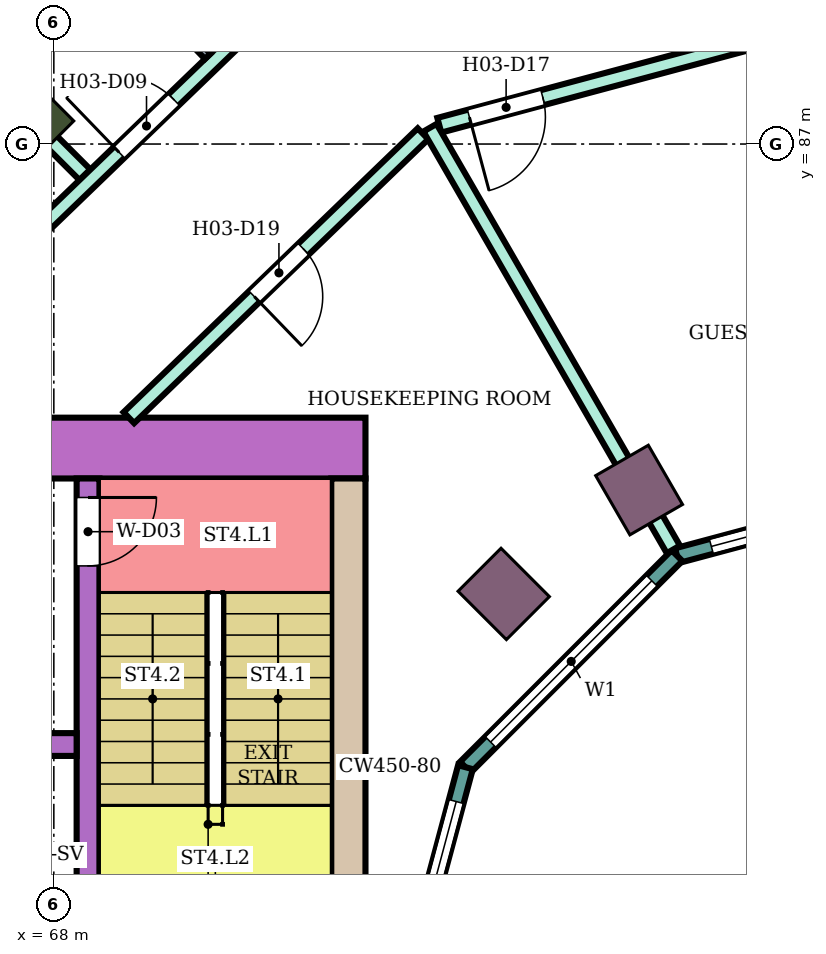
"""IFC4 building model, lengths in metres.
Left out: names, types, materials, properties, quantities, classifications, styles, units other than length and angle.
Written with IfcOpenShell. Run it as: python <this file> out.ifc"""

import sys

from ifc_helpers import new_model, si_unit, direction, frame, frame_2d, origin, origin_2d, place, context, subcontext, project, spatial, rectangle, extrude, element, fill, save


model = new_model("IFC4")
c1 = context("Model", 3, precision=1e-05, world=origin(), true_north=direction((0.0, 1.0)))
c2 = subcontext(c1, "Body", "Model", "MODEL_VIEW")
j1 = project(units=[si_unit("LENGTHUNIT", "METRE"), si_unit("PLANEANGLEUNIT", "RADIAN")], contexts=[c1])
p1 = place(None, origin())
s1 = spatial("IfcSite", under=j1, at=p1, CompositionType="ELEMENT")
p2 = place(p1, origin())
s2 = spatial("IfcBuilding", under=s1, at=p2, CompositionType="ELEMENT")
p3 = place(p2, frame((0.0, 0.0, 55.4)))
s3 = spatial("IfcBuildingStorey", under=s2, at=p3, CompositionType="ELEMENT", Elevation=55.4)
p4 = place(p3, frame((67.555, 87.445, 0.0), z_axis=(0.0, 0.0, 1.0), x_axis=(-0.707106781187, 0.707106781187, 0.0)))
e1 = element("IfcColumn", 1, at=p4, inside=s3, PredefinedType="COLUMN", context=c2, shape_type="SweptSolid", body=[
    extrude(rectangle(XDim=1.2, YDim=0.8, at=origin_2d()), origin(), (0.0, 0.0, 1.0), 3.8),
])
for number, where, z_axis, x_axis in (
    (2, (75.7, 82.448, 0.0), (0.0, 0.0, 1.0), (-0.5, 0.866, 0.0)),
    (3, (73.919, 81.081, 0.0), (0.0, 0.0, 1.0), (-0.707, 0.707, 0.0)),
):
    element("IfcColumn", number, at=place(p3, frame(where, z_axis=z_axis, x_axis=x_axis)), inside=s3, PredefinedType="COLUMN", context=c2, shape_type="SweptSolid", body=[
        extrude(rectangle(XDim=0.9, YDim=0.8, at=origin_2d()), origin(), (0.0, 0.0, 1.0), 3.8),
    ])
p5 = place(p3, frame((72.1, 83.0, 0.0), z_axis=(0.0, 0.0, 1.0), x_axis=(-1.0, 0.0, 0.0)))
e4 = element("IfcWall", 4, at=p5, inside=s3, PredefinedType="SHEAR", context=c2, shape_type="SweptSolid", body=[
    extrude(rectangle(XDim=14.7, YDim=0.8, at=frame_2d((7.35, 0.0))), origin(), (0.0, 0.0, 1.0), 3.48),
])
p6 = place(p5, frame((4.2, 0.0, 0.0)))
e5 = element("IfcOpeningElement", 5, at=p6, cuts=e4, PredefinedType="OPENING", context=c2, shape_type="SweptSolid", body=[
    extrude(rectangle(XDim=2.4, YDim=2.4, at=frame_2d((1.2, 1.2))), frame((0.0, 0.41, 0.0), z_axis=(0.0, -1.0, 0.0), x_axis=(1.0, 0.0, 0.0)), (0.0, 0.0, 1.0), 0.82),
])
p7 = place(p3, frame((71.875, 82.6, 0.0), z_axis=(0.0, 0.0, 1.0), x_axis=(0.0, -1.0, 0.0)))
e6 = element("IfcWall", 6, at=p7, inside=s3, PredefinedType="SHEAR", context=c2, shape_type="SweptSolid", body=[
    extrude(rectangle(XDim=7.6, YDim=0.45, at=frame_2d((3.8, 0.0))), origin(), (0.0, 0.0, 1.0), 3.48),
])
p8 = place(p3, frame((68.45, 82.6, 0.0), z_axis=(0.0, 0.0, 1.0), x_axis=(0.0, -1.0, 0.0)))
e7 = element("IfcWall", 7, at=p8, inside=s3, PredefinedType="SHEAR", context=c2, shape_type="SweptSolid", body=[
    extrude(rectangle(XDim=7.6, YDim=0.3, at=frame_2d((3.8, 0.0))), origin(), (0.0, 0.0, 1.0), 3.48),
])
p9 = place(p8, frame((0.25, 0.0, 0.0)))
e8 = element("IfcOpeningElement", 8, at=p9, cuts=e7, PredefinedType="OPENING", context=c2, shape_type="SweptSolid", body=[
    extrude(rectangle(XDim=0.9, YDim=2.1, at=frame_2d((0.45, 1.05))), frame((0.0, 0.16, 0.0), z_axis=(0.0, -1.0, 0.0), x_axis=(1.0, 0.0, 0.0)), (0.0, 0.0, 1.0), 0.32),
])
p10 = place(p3, frame((68.3, 79.1, 0.0), z_axis=(0.0, 0.0, 1.0), x_axis=(-1.0, 0.0, 0.0)))
e9 = element("IfcWall", 9, at=p10, inside=s3, PredefinedType="SHEAR", context=c2, shape_type="SweptSolid", body=[
    extrude(rectangle(XDim=10.9, YDim=0.3, at=frame_2d((5.45, 0.0))), origin(), (0.0, 0.0, 1.0), 3.48),
])
p11 = place(p10, frame((0.4, 0.0, 0.0)))
e10 = element("IfcOpeningElement", 10, at=p11, cuts=e9, PredefinedType="OPENING", context=c2, shape_type="SweptSolid", body=[
    extrude(rectangle(XDim=1.4, YDim=2.1, at=frame_2d((0.7, 1.05))), frame((0.0, 0.16, 0.0), z_axis=(0.0, -1.0, 0.0), x_axis=(1.0, 0.0, 0.0)), (0.0, 0.0, 1.0), 0.32),
])
p12 = place(p10, frame((5.4, 0.0, 0.0)))
e11 = element("IfcOpeningElement", 11, at=p12, cuts=e9, PredefinedType="OPENING", context=c2, shape_type="SweptSolid", body=[
    extrude(rectangle(XDim=1.4, YDim=2.1, at=frame_2d((0.7, 1.05))), frame((0.0, 0.16, 0.0), z_axis=(0.0, -1.0, 0.0), x_axis=(1.0, 0.0, 0.0)), (0.0, 0.0, 1.0), 0.32),
])
p13 = place(p10, frame((8.1, 0.0, 0.0)))
e12 = element("IfcOpeningElement", 12, at=p13, cuts=e9, PredefinedType="OPENING", context=c2, shape_type="SweptSolid", body=[
    extrude(rectangle(XDim=1.0, YDim=2.1, at=frame_2d((0.5, 1.05))), frame((0.0, 0.16, 0.0), z_axis=(0.0, -1.0, 0.0), x_axis=(1.0, 0.0, 0.0)), (0.0, 0.0, 1.0), 0.32),
])
p14 = place(p3, frame((80.0, 82.604, 0.0), z_axis=(0.0, 0.0, 1.0), x_axis=(-0.965933654434, -0.258789828301, 0.0)))
e13 = element("IfcWall", 13, at=p14, inside=s3, PredefinedType="NOTDEFINED", context=c2, shape_type="SweptSolid", body=[
    extrude(rectangle(XDim=3.936, YDim=0.2, at=frame_2d((1.968, 0.0))), origin(), (0.0, 0.0, 1.0), 3.8),
])
p15 = place(p14, frame((0.468, 0.0, 0.9)))
e14 = element("IfcOpeningElement", 14, at=p15, cuts=e13, PredefinedType="OPENING", context=c2, shape_type="SweptSolid", body=[
    extrude(rectangle(XDim=3.0, YDim=2.3, at=frame_2d((1.5, 1.15))), frame((0.0, 0.11, 0.0), z_axis=(0.0, -1.0, 0.0), x_axis=(1.0, 0.0, 0.0)), (0.0, 0.0, 1.0), 0.22),
])
p16 = place(p3, frame((76.198, 81.585, 0.0), z_axis=(0.0, 0.0, 1.0), x_axis=(-0.707106781187, -0.707106781187, 0.0)))
e15 = element("IfcWall", 15, at=p16, inside=s3, PredefinedType="NOTDEFINED", context=c2, shape_type="SweptSolid", body=[
    extrude(rectangle(XDim=3.936, YDim=0.2, at=frame_2d((1.968, 0.0))), origin(), (0.0, 0.0, 1.0), 3.8),
])
p17 = place(p16, frame((0.468, 0.0, 0.9)))
e16 = element("IfcOpeningElement", 16, at=p17, cuts=e15, PredefinedType="OPENING", context=c2, shape_type="SweptSolid", body=[
    extrude(rectangle(XDim=3.0, YDim=2.3, at=frame_2d((1.5, 1.15))), frame((0.0, 0.11, 0.0), z_axis=(0.0, -1.0, 0.0), x_axis=(1.0, 0.0, 0.0)), (0.0, 0.0, 1.0), 0.22),
])
p18 = place(p3, frame((73.415, 78.802, 0.0), z_axis=(0.0, 0.0, 1.0), x_axis=(-0.258789828301, -0.965933654434, 0.0)))
e17 = element("IfcWall", 17, at=p18, inside=s3, PredefinedType="NOTDEFINED", context=c2, shape_type="SweptSolid", body=[
    extrude(rectangle(XDim=3.936, YDim=0.2, at=frame_2d((1.968, 0.0))), origin(), (0.0, 0.0, 1.0), 3.8),
])
p19 = place(p18, frame((0.468, 0.0, 0.9)))
e18 = element("IfcOpeningElement", 18, at=p19, cuts=e17, PredefinedType="OPENING", context=c2, shape_type="SweptSolid", body=[
    extrude(rectangle(XDim=3.0, YDim=2.3, at=frame_2d((1.5, 1.15))), frame((0.0, 0.11, 0.0), z_axis=(0.0, -1.0, 0.0), x_axis=(1.0, 0.0, 0.0)), (0.0, 0.0, 1.0), 0.22),
])
p20 = place(p3, frame((63.598, 91.408, 0.0), z_axis=(0.0, 0.0, 1.0), x_axis=(0.706999146394, -0.707214399597, 0.0)))
e19 = element("IfcWall", 19, at=p20, inside=s3, PredefinedType="PARTITIONING", context=c2, shape_type="SweptSolid", body=[
    extrude(rectangle(XDim=6.805, YDim=0.2, at=frame_2d((3.403, 0.0))), origin(), (0.0, 0.0, 1.0), 3.35),
])
p21 = place(p3, frame((66.797, 84.9, 0.0), z_axis=(0.0, 0.0, 1.0), x_axis=(0.719692092412, 0.694293376116, 0.0)))
e20 = element("IfcWall", 20, at=p21, inside=s3, PredefinedType="PARTITIONING", context=c2, shape_type="SweptSolid", body=[
    extrude(rectangle(XDim=6.584, YDim=0.2, at=frame_2d((3.292, 0.0))), origin(), (0.0, 0.0, 1.0), 3.35),
])
p22 = place(p21, frame((2.866, 0.0, 0.0)))
e21 = element("IfcOpeningElement", 21, at=p22, cuts=e20, PredefinedType="OPENING", context=c2, shape_type="SweptSolid", body=[
    extrude(rectangle(XDim=1.0, YDim=2.1, at=frame_2d((0.5, 1.05))), frame((0.0, 0.11, 0.0), z_axis=(0.0, -1.0, 0.0), x_axis=(1.0, 0.0, 0.0)), (0.0, 0.0, 1.0), 0.22),
])
p23 = place(p3, frame((68.987, 83.4, 0.0), z_axis=(0.0, 0.0, 1.0), x_axis=(0.719547721855, 0.694442996922, 0.0)))
e22 = element("IfcWall", 22, at=p23, inside=s3, PredefinedType="PARTITIONING", context=c2, shape_type="SweptSolid", body=[
    extrude(rectangle(XDim=5.378, YDim=0.2, at=frame_2d((2.689, 0.0))), origin(), (0.0, 0.0, 1.0), 3.35),
])
p24 = place(p23, frame((2.294, 0.0, 0.0)))
e23 = element("IfcOpeningElement", 23, at=p24, cuts=e22, PredefinedType="OPENING", context=c2, shape_type="SweptSolid", body=[
    extrude(rectangle(XDim=0.9, YDim=2.1, at=frame_2d((0.45, 1.05))), frame((0.0, 0.11, 0.0), z_axis=(0.0, -1.0, 0.0), x_axis=(1.0, 0.0, 0.0)), (0.0, 0.0, 1.0), 0.22),
])
p25 = place(p3, frame((73.071, 87.247, 0.0), z_axis=(0.0, 0.0, 1.0), x_axis=(0.965931651205, 0.258797305243, 0.0)))
e24 = element("IfcWall", 24, at=p25, inside=s3, PredefinedType="PARTITIONING", context=c2, shape_type="SweptSolid", body=[
    extrude(rectangle(XDim=7.043, YDim=0.2, at=frame_2d((3.521, 0.0))), origin(), (0.0, 0.0, 1.0), 3.35),
])
p26 = place(p25, frame((0.41, 0.0, 0.0)))
e25 = element("IfcOpeningElement", 25, at=p26, cuts=e24, PredefinedType="OPENING", context=c2, shape_type="SweptSolid", body=[
    extrude(rectangle(XDim=1.0, YDim=2.1, at=frame_2d((0.5, 1.05))), frame((0.0, 0.11, 0.0), z_axis=(0.0, -1.0, 0.0), x_axis=(1.0, 0.0, 0.0)), (0.0, 0.0, 1.0), 0.22),
])
p27 = place(p3, frame((72.949, 87.214, 0.0), z_axis=(0.0, 0.0, 1.0), x_axis=(0.499927021214, -0.866067534006, 0.0)))
e26 = element("IfcWall", 26, at=p27, inside=s3, PredefinedType="PARTITIONING", context=c2, shape_type="SweptSolid", body=[
    extrude(rectangle(XDim=6.405, YDim=0.2, at=frame_2d((3.203, 0.0))), origin(), (0.0, 0.0, 1.0), 3.35),
])
p28 = place(p3, frame((68.185, 90.06, 0.0), z_axis=(0.0, 0.0, 1.0), x_axis=(0.69446127412, -0.719530081892, 0.0)))
e27 = element("IfcWall", 27, at=p28, inside=s3, PredefinedType="PARTITIONING", context=c2, shape_type="SweptSolid", body=[
    extrude(rectangle(XDim=2.649, YDim=0.1, at=frame_2d((1.324, 0.0))), origin(), (0.0, 0.0, 1.0), 3.35),
])
p29 = place(p28, frame((0.95, 0.0, 0.0)))
e28 = element("IfcOpeningElement", 28, at=p29, cuts=e27, PredefinedType="OPENING", context=c2, shape_type="SweptSolid", body=[
    extrude(rectangle(XDim=0.8, YDim=2.1, at=frame_2d((0.4, 1.05))), frame((0.0, 0.06, 0.0), z_axis=(0.0, -1.0, 0.0), x_axis=(1.0, 0.0, 0.0)), (0.0, 0.0, 1.0), 0.12),
])
p30 = place(p15, origin())
e29 = element("IfcWindow", 29, at=p30, inside=s3, PartitioningType="SINGLE_PANEL", PredefinedType="WINDOW", context=c2, shape_type="SweptSolid", body=[
    extrude(rectangle(XDim=3.0, YDim=2.3, at=frame_2d((1.5, 1.15))), frame((0.0, 0.03, 0.0), z_axis=(0.0, -1.0, 0.0), x_axis=(1.0, 0.0, 0.0)), (0.0, 0.0, 1.0), 0.06),
])
fill(e14, e29)
p31 = place(p17, origin())
e30 = element("IfcWindow", 30, at=p31, inside=s3, PartitioningType="SINGLE_PANEL", PredefinedType="WINDOW", context=c2, shape_type="SweptSolid", body=[
    extrude(rectangle(XDim=3.0, YDim=2.3, at=frame_2d((1.5, 1.15))), frame((0.0, 0.03, 0.0), z_axis=(0.0, -1.0, 0.0), x_axis=(1.0, 0.0, 0.0)), (0.0, 0.0, 1.0), 0.06),
])
fill(e16, e30)
p32 = place(p19, origin())
e31 = element("IfcWindow", 31, at=p32, inside=s3, PartitioningType="SINGLE_PANEL", PredefinedType="WINDOW", context=c2, shape_type="SweptSolid", body=[
    extrude(rectangle(XDim=3.0, YDim=2.3, at=frame_2d((1.5, 1.15))), frame((0.0, 0.03, 0.0), z_axis=(0.0, -1.0, 0.0), x_axis=(1.0, 0.0, 0.0)), (0.0, 0.0, 1.0), 0.06),
])
fill(e18, e31)
p33 = place(p22, origin())
e32 = element("IfcDoor", 32, at=p33, inside=s3, OperationType="SINGLE_SWING_LEFT", PredefinedType="DOOR", context=c2, shape_type="SweptSolid", body=[
    extrude(rectangle(XDim=1.0, YDim=2.1, at=frame_2d((0.5, 1.05))), frame((0.0, 0.025, 0.0), z_axis=(0.0, -1.0, 0.0), x_axis=(1.0, 0.0, 0.0)), (0.0, 0.0, 1.0), 0.05),
])
fill(e21, e32)
p34 = place(p26, frame((1.0, 0.0, 0.0), z_axis=(0.0, 0.0, 1.0), x_axis=(-1.0, 0.0, 0.0)))
e33 = element("IfcDoor", 33, at=p34, inside=s3, OperationType="SINGLE_SWING_RIGHT", PredefinedType="DOOR", context=c2, shape_type="SweptSolid", body=[
    extrude(rectangle(XDim=1.0, YDim=2.1, at=frame_2d((0.5, 1.05))), frame((0.0, 0.025, 0.0), z_axis=(0.0, -1.0, 0.0), x_axis=(1.0, 0.0, 0.0)), (0.0, 0.0, 1.0), 0.05),
])
fill(e25, e33)
p35 = place(p24, frame((0.9, 0.0, 0.0), z_axis=(0.0, 0.0, 1.0), x_axis=(-1.0, 0.0, 0.0)))
e34 = element("IfcDoor", 34, at=p35, inside=s3, OperationType="SINGLE_SWING_RIGHT", PredefinedType="DOOR", context=c2, shape_type="SweptSolid", body=[
    extrude(rectangle(XDim=0.9, YDim=2.1, at=frame_2d((0.45, 1.05))), frame((0.0, 0.025, 0.0), z_axis=(0.0, -1.0, 0.0), x_axis=(1.0, 0.0, 0.0)), (0.0, 0.0, 1.0), 0.05),
])
fill(e23, e34)
p36 = place(p9, origin())
e35 = element("IfcDoor", 35, at=p36, inside=s3, OperationType="SINGLE_SWING_LEFT", PredefinedType="DOOR", context=c2, shape_type="SweptSolid", body=[
    extrude(rectangle(XDim=0.9, YDim=2.1, at=frame_2d((0.45, 1.05))), frame((0.0, 0.025, 0.0), z_axis=(0.0, -1.0, 0.0), x_axis=(1.0, 0.0, 0.0)), (0.0, 0.0, 1.0), 0.05),
])
fill(e8, e35)
save(model, sys.argv[1])
